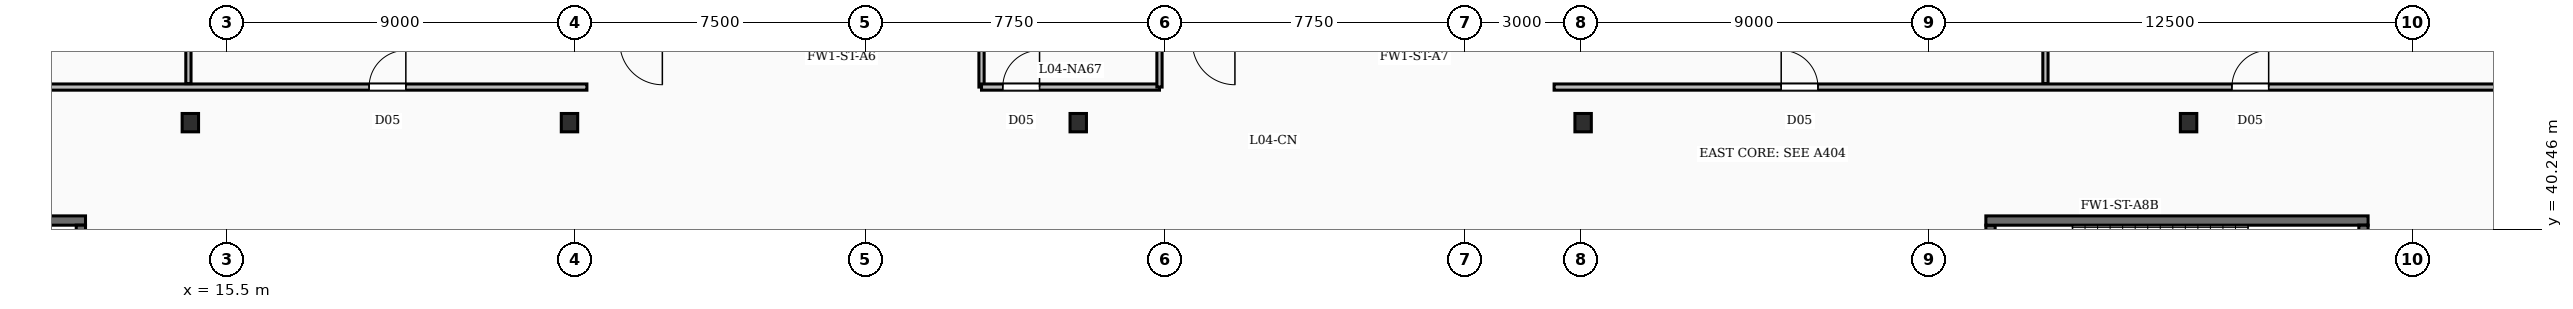
"""IFC4 building model, lengths in metres.
Left out: names, types, materials, properties, quantities, classifications, styles, units other than length and angle.
Written with IfcOpenShell. Run it as: python <this file> out.ifc"""

import sys

from ifc_helpers import new_model, si_unit, direction, frame, frame_2d, origin, origin_2d, place, context, subcontext, project, spatial, rectangle, i_section, extrude, element, fill, save


model = new_model("IFC4")
c1 = context("Model", 3, precision=1e-05, world=origin(), true_north=direction((0.0, 1.0)))
c2 = subcontext(c1, "Body", "Model", "MODEL_VIEW")
j1 = project(units=[si_unit("LENGTHUNIT", "METRE"), si_unit("PLANEANGLEUNIT", "RADIAN")], contexts=[c1])
p1 = place(None, origin())
s1 = spatial("IfcSite", under=j1, at=p1, CompositionType="ELEMENT")
p2 = place(p1, origin())
s2 = spatial("IfcBuilding", under=s1, at=p2, CompositionType="ELEMENT")
p3 = place(p2, frame((0.0, 0.0, 23.0)))
s3 = spatial("IfcBuildingStorey", under=s2, at=p3, CompositionType="ELEMENT", Elevation=23.0)
for number, where, z_axis, x_axis in (
    (1, (14.55, 43.0, -0.35), (0.0, 0.0, 1.0), (1.0, 0.0, 0.0)),
    (2, (24.35, 43.0, -0.35), (0.0, 0.0, 1.0), (1.0, 0.0, 0.0)),
    (3, (37.5, 43.0, -0.35), (0.0, 0.0, 1.0), (1.0, 0.0, 0.0)),
    (4, (50.55, 43.0, -0.35), (0.0, 0.0, 1.0), (1.0, 0.0, 0.0)),
    (5, (66.2, 43.0, -0.35), (0.0, 0.0, 1.0), (1.0, 0.0, 0.0)),
):
    element("IfcColumn", number, at=place(p3, frame(where, z_axis=z_axis, x_axis=x_axis)), inside=s3, PredefinedType="COLUMN", context=c2, shape_type="SweptSolid", body=[
        extrude(i_section(OverallWidth=0.424, OverallDepth=0.474, WebThickness=0.048, FlangeThickness=0.077, FilletRadius=0.02, at=origin_2d()), origin(), (0.0, 0.0, 1.0), 5.0),
    ])
p4 = place(p3, frame((1.96, 40.47, 0.0), z_axis=(0.0, 0.0, 1.0), x_axis=(1.0, 0.0, 0.0)))
e6 = element("IfcWall", 6, at=p4, inside=s3, PredefinedType="SOLIDWALL", context=c2, shape_type="SweptSolid", body=[
    extrude(rectangle(XDim=9.88, YDim=0.24, at=frame_2d((4.94, 0.0))), origin(), (0.0, 0.0, 1.0), 4.65),
])
p5 = place(p3, frame((11.72, 36.2, 0.0), z_axis=(0.0, 0.0, 1.0), x_axis=(0.0, 1.0, 0.0)))
e7 = element("IfcWall", 7, at=p5, inside=s3, PredefinedType="SOLIDWALL", context=c2, shape_type="SweptSolid", body=[
    extrude(rectangle(XDim=4.15, YDim=0.24, at=frame_2d((2.075, 0.0))), origin(), (0.0, 0.0, 1.0), 4.65),
])
p6 = place(p3, frame((60.96, 40.47, 0.0), z_axis=(0.0, 0.0, 1.0), x_axis=(1.0, 0.0, 0.0)))
e8 = element("IfcWall", 8, at=p6, inside=s3, PredefinedType="SOLIDWALL", context=c2, shape_type="SweptSolid", body=[
    extrude(rectangle(XDim=9.88, YDim=0.24, at=frame_2d((4.94, 0.0))), origin(), (0.0, 0.0, 1.0), 4.65),
])
for number, where, z_axis, x_axis in (
    (9, (61.08, 36.2, 0.0), (0.0, 0.0, 1.0), (0.0, 1.0, 0.0)),
    (10, (70.72, 36.2, 0.0), (0.0, 0.0, 1.0), (0.0, 1.0, 0.0)),
):
    element("IfcWall", number, at=place(p3, frame(where, z_axis=z_axis, x_axis=x_axis)), inside=s3, PredefinedType="SOLIDWALL", context=c2, shape_type="SweptSolid", body=[
        extrude(rectangle(XDim=4.15, YDim=0.24, at=frame_2d((2.075, 0.0))), origin(), (0.0, 0.0, 1.0), 4.65),
    ])
p7 = place(p3, frame((14.5, 44.01, 0.0), z_axis=(0.0, 0.0, 1.0), x_axis=(0.0, 1.0, 0.0)))
e11 = element("IfcWall", 11, at=p7, inside=s3, PredefinedType="PARTITIONING", context=c2, shape_type="SweptSolid", body=[
    extrude(rectangle(XDim=10.49, YDim=0.135, at=frame_2d((5.245, 0.0))), origin(), (0.0, 0.0, 1.0), 3.71),
])
p8 = place(p7, frame((2.2, 0.0, 0.0)))
e12 = element("IfcOpeningElement", 12, at=p8, cuts=e11, PredefinedType="OPENING", context=c2, shape_type="SweptSolid", body=[
    extrude(rectangle(XDim=0.95, YDim=2.15, at=frame_2d((0.475, 1.075))), frame((0.0, 0.077, 0.0), z_axis=(0.0, -1.0, 0.0), x_axis=(1.0, 0.0, 0.0)), (0.0, 0.0, 1.0), 0.155),
])
p9 = place(p3, frame((0.0, 43.92, 0.0), z_axis=(0.0, 0.0, 1.0), x_axis=(1.0, 0.0, 0.0)))
e13 = element("IfcWall", 13, at=p9, inside=s3, PredefinedType="PARTITIONING", context=c2, shape_type="SweptSolid", body=[
    extrude(rectangle(XDim=24.8, YDim=0.16, at=frame_2d((12.4, 0.0))), origin(), (0.0, 0.0, 1.0), 3.71),
])
p10 = place(p9, frame((19.17, 0.0, 0.0)))
e14 = element("IfcOpeningElement", 14, at=p10, cuts=e13, PredefinedType="OPENING", context=c2, shape_type="SweptSolid", body=[
    extrude(rectangle(XDim=0.95, YDim=2.15, at=frame_2d((0.475, 1.075))), frame((0.0, 0.09, 0.0), z_axis=(0.0, -1.0, 0.0), x_axis=(1.0, 0.0, 0.0)), (0.0, 0.0, 1.0), 0.18),
])
p11 = place(p3, frame((62.5, 44.01, 0.0), z_axis=(0.0, 0.0, 1.0), x_axis=(0.0, 1.0, 0.0)))
e15 = element("IfcWall", 15, at=p11, inside=s3, PredefinedType="PARTITIONING", context=c2, shape_type="SweptSolid", body=[
    extrude(rectangle(XDim=10.49, YDim=0.135, at=frame_2d((5.245, 0.0))), origin(), (0.0, 0.0, 1.0), 3.71),
])
p12 = place(p11, frame((2.2, 0.0, 0.0)))
e16 = element("IfcOpeningElement", 16, at=p12, cuts=e15, PredefinedType="OPENING", context=c2, shape_type="SweptSolid", body=[
    extrude(rectangle(XDim=0.95, YDim=2.15, at=frame_2d((0.475, 1.075))), frame((0.0, 0.077, 0.0), z_axis=(0.0, -1.0, 0.0), x_axis=(1.0, 0.0, 0.0)), (0.0, 0.0, 1.0), 0.155),
])
p13 = place(p3, frame((49.8, 43.92, 0.0), z_axis=(0.0, 0.0, 1.0), x_axis=(1.0, 0.0, 0.0)))
e17 = element("IfcWall", 17, at=p13, inside=s3, PredefinedType="PARTITIONING", context=c2, shape_type="SweptSolid", body=[
    extrude(rectangle(XDim=29.7, YDim=0.16, at=frame_2d((14.85, 0.0))), origin(), (0.0, 0.0, 1.0), 3.71),
])
p14 = place(p13, frame((5.87, 0.0, 0.0)))
e18 = element("IfcOpeningElement", 18, at=p14, cuts=e17, PredefinedType="OPENING", context=c2, shape_type="SweptSolid", body=[
    extrude(rectangle(XDim=0.95, YDim=2.15, at=frame_2d((0.475, 1.075))), frame((0.0, 0.09, 0.0), z_axis=(0.0, -1.0, 0.0), x_axis=(1.0, 0.0, 0.0)), (0.0, 0.0, 1.0), 0.18),
])
p15 = place(p13, frame((17.52, 0.0, 0.0)))
e19 = element("IfcOpeningElement", 19, at=p15, cuts=e17, PredefinedType="OPENING", context=c2, shape_type="SweptSolid", body=[
    extrude(rectangle(XDim=0.95, YDim=2.15, at=frame_2d((0.475, 1.075))), frame((0.0, 0.09, 0.0), z_axis=(0.0, -1.0, 0.0), x_axis=(1.0, 0.0, 0.0)), (0.0, 0.0, 1.0), 0.18),
])
p16 = place(p3, frame((35.0, 43.92, 0.0), z_axis=(0.0, 0.0, 1.0), x_axis=(1.0, 0.0, 0.0)))
e20 = element("IfcWall", 20, at=p16, inside=s3, PredefinedType="PARTITIONING", context=c2, shape_type="SweptSolid", body=[
    extrude(rectangle(XDim=4.6, YDim=0.16, at=frame_2d((2.3, 0.0))), origin(), (0.0, 0.0, 1.0), 3.71),
])
p17 = place(p16, frame((0.55, 0.0, 0.0)))
e21 = element("IfcOpeningElement", 21, at=p17, cuts=e20, PredefinedType="OPENING", context=c2, shape_type="SweptSolid", body=[
    extrude(rectangle(XDim=0.95, YDim=2.15, at=frame_2d((0.475, 1.075))), frame((0.0, 0.09, 0.0), z_axis=(0.0, -1.0, 0.0), x_axis=(1.0, 0.0, 0.0)), (0.0, 0.0, 1.0), 0.18),
])
for number, where, z_axis, x_axis in (
    (22, (35.0, 43.92, 0.0), (0.0, 0.0, 1.0), (0.0, 1.0, 0.0)),
    (23, (39.6, 43.92, 0.0), (0.0, 0.0, 1.0), (0.0, 1.0, 0.0)),
):
    element("IfcWall", number, at=place(p3, frame(where, z_axis=z_axis, x_axis=x_axis)), inside=s3, PredefinedType="PARTITIONING", context=c2, shape_type="SweptSolid", body=[
        extrude(rectangle(XDim=10.58, YDim=0.135, at=frame_2d((5.29, 0.0))), origin(), (0.0, 0.0, 1.0), 3.71),
    ])
p18 = place(p10, origin())
e24 = element("IfcDoor", 24, at=p18, inside=s3, OperationType="SINGLE_SWING_RIGHT", PredefinedType="DOOR", context=c2, shape_type="SweptSolid", body=[
    extrude(rectangle(XDim=0.95, YDim=2.15, at=frame_2d((0.475, 1.075))), frame((0.0, 0.025, 0.0), z_axis=(0.0, -1.0, 0.0), x_axis=(1.0, 0.0, 0.0)), (0.0, 0.0, 1.0), 0.05),
])
fill(e14, e24)
p19 = place(p14, origin())
e25 = element("IfcDoor", 25, at=p19, inside=s3, OperationType="SINGLE_SWING_LEFT", PredefinedType="DOOR", context=c2, shape_type="SweptSolid", body=[
    extrude(rectangle(XDim=0.95, YDim=2.15, at=frame_2d((0.475, 1.075))), frame((0.0, 0.025, 0.0), z_axis=(0.0, -1.0, 0.0), x_axis=(1.0, 0.0, 0.0)), (0.0, 0.0, 1.0), 0.05),
])
fill(e18, e25)
p20 = place(p15, origin())
e26 = element("IfcDoor", 26, at=p20, inside=s3, OperationType="SINGLE_SWING_RIGHT", PredefinedType="DOOR", context=c2, shape_type="SweptSolid", body=[
    extrude(rectangle(XDim=0.95, YDim=2.15, at=frame_2d((0.475, 1.075))), frame((0.0, 0.025, 0.0), z_axis=(0.0, -1.0, 0.0), x_axis=(1.0, 0.0, 0.0)), (0.0, 0.0, 1.0), 0.05),
])
fill(e19, e26)
p21 = place(p17, origin())
e27 = element("IfcDoor", 27, at=p21, inside=s3, OperationType="SINGLE_SWING_RIGHT", PredefinedType="DOOR", context=c2, shape_type="SweptSolid", body=[
    extrude(rectangle(XDim=0.95, YDim=2.15, at=frame_2d((0.475, 1.075))), frame((0.0, 0.025, 0.0), z_axis=(0.0, -1.0, 0.0), x_axis=(1.0, 0.0, 0.0)), (0.0, 0.0, 1.0), 0.05),
])
fill(e21, e27)
save(model, sys.argv[1])
